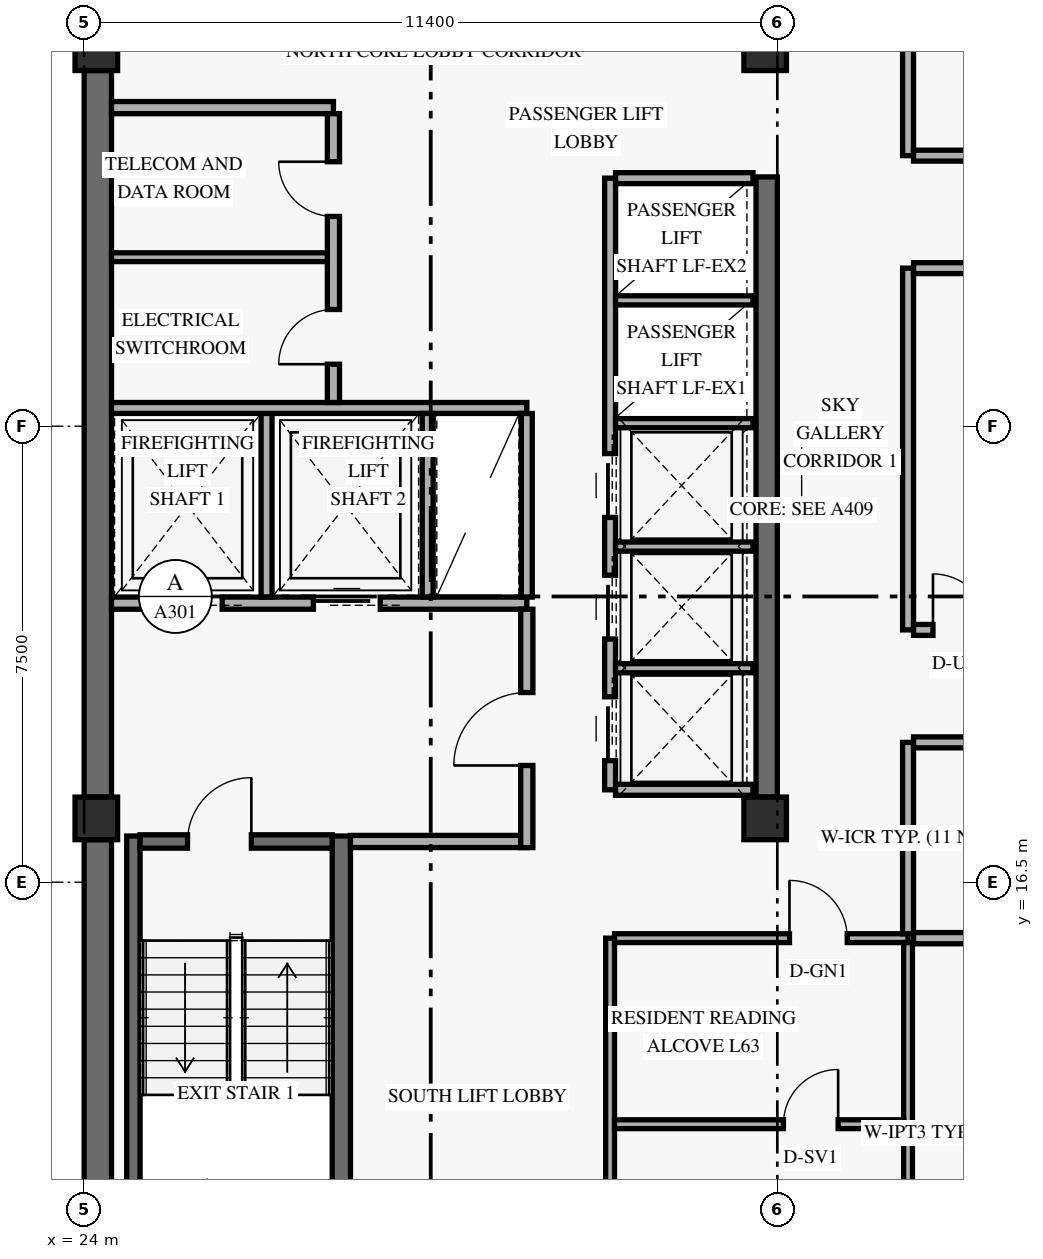
"""IFC4 building model, lengths in metres.
Left out: names, types, materials, properties, quantities, classifications, styles, units other than length and angle.
Written with IfcOpenShell. Run it as: python <this file> out.ifc"""

import sys

from ifc_helpers import new_model, si_unit, direction, frame, frame_2d, origin, origin_2d, place, context, subcontext, project, spatial, rectangle, extrude, element, fill, save


model = new_model("IFC4")
c1 = context("Model", 3, precision=1e-05, world=origin(), true_north=direction((0.0, 1.0)))
c2 = subcontext(c1, "Body", "Model", "MODEL_VIEW")
j1 = project(units=[si_unit("LENGTHUNIT", "METRE"), si_unit("PLANEANGLEUNIT", "RADIAN")], contexts=[c1])
p1 = place(None, origin())
s1 = spatial("IfcSite", under=j1, at=p1, CompositionType="ELEMENT")
p2 = place(p1, origin())
s2 = spatial("IfcBuilding", under=s1, at=p2, CompositionType="ELEMENT")
p3 = place(p2, frame((0.0, 0.0, 242.4)))
s3 = spatial("IfcBuildingStorey", under=s2, at=p3, CompositionType="ELEMENT", Elevation=242.4)
p4 = place(p3, frame((24.225, 9.6, 0.0), z_axis=(0.0, 0.0, 1.0), x_axis=(0.0, 1.0, 0.0)))
e1 = element("IfcWall", 1, at=p4, inside=s3, PredefinedType="SHEAR", context=c2, shape_type="SweptSolid", body=[
    extrude(rectangle(XDim=7.6, YDim=0.45, at=frame_2d((3.8, 0.0))), origin(), (0.0, 0.0, 1.0), 2.821),
])
p5 = place(p3, frame((24.225, 17.9, 0.0), z_axis=(0.0, 0.0, 1.0), x_axis=(0.0, 1.0, 0.0)))
e2 = element("IfcWall", 2, at=p5, inside=s3, PredefinedType="SHEAR", context=c2, shape_type="SweptSolid", body=[
    extrude(rectangle(XDim=11.95, YDim=0.45, at=frame_2d((5.975, 0.0))), origin(), (0.0, 0.0, 1.0), 2.821),
])
p6 = place(p3, frame((35.225, 17.9, 0.0), z_axis=(0.0, 0.0, 1.0), x_axis=(0.0, 1.0, 0.0)))
e3 = element("IfcWall", 3, at=p6, inside=s3, PredefinedType="SHEAR", context=c2, shape_type="SweptSolid", body=[
    extrude(rectangle(XDim=10.2, YDim=0.35, at=frame_2d((5.1, 0.0))), origin(), (0.0, 0.0, 1.0), 2.821),
])
p7 = place(p3, frame((24.81, 9.5, 0.0), z_axis=(0.0, 0.0, 1.0), x_axis=(0.0, 1.0, 0.0)))
e4 = element("IfcWall", 4, at=p7, inside=s3, PredefinedType="SHEAR", context=c2, shape_type="SweptSolid", body=[
    extrude(rectangle(XDim=7.76, YDim=0.22, at=frame_2d((3.88, 0.0))), origin(), (0.0, 0.0, 1.0), 3.36),
])
p8 = place(p3, frame((28.23, 9.5, 0.0), z_axis=(0.0, 0.0, 1.0), x_axis=(0.0, 1.0, 0.0)))
e5 = element("IfcWall", 5, at=p8, inside=s3, PredefinedType="SHEAR", context=c2, shape_type="SweptSolid", body=[
    extrude(rectangle(XDim=7.76, YDim=0.3, at=frame_2d((3.88, 0.0))), origin(), (0.0, 0.0, 1.0), 3.36),
])
p9 = place(p3, frame((24.92, 17.17, 0.0), z_axis=(0.0, 0.0, 1.0), x_axis=(1.0, 0.0, 0.0)))
e6 = element("IfcWall", 6, at=p9, inside=s3, PredefinedType="SHEAR", context=c2, shape_type="SweptSolid", body=[
    extrude(rectangle(XDim=3.16, YDim=0.22, at=frame_2d((1.58, 0.0))), origin(), (0.0, 0.0, 1.0), 3.36),
])
p10 = place(p9, frame((0.78, 0.0, 0.0)))
e7 = element("IfcOpeningElement", 7, at=p10, cuts=e6, PredefinedType="OPENING", context=c2, shape_type="SweptSolid", body=[
    extrude(rectangle(XDim=1.05, YDim=2.15, at=frame_2d((0.525, 1.075))), frame((0.0, 0.12, 0.0), z_axis=(0.0, -1.0, 0.0), x_axis=(1.0, 0.0, 0.0)), (0.0, 0.0, 1.0), 0.24),
])
for number, where, z_axis, x_axis in (
    (8, (24.2, 17.55, 0.0), (0.0, 0.0, 1.0), (1.0, 0.0, 0.0)),
    (9, (24.2, 30.2, 0.0), (0.0, 0.0, 1.0), (1.0, 0.0, 0.0)),
    (10, (35.2, 17.55, 0.0), (0.0, 0.0, 1.0), (1.0, 0.0, 0.0)),
    (11, (35.2, 30.2, 0.0), (0.0, 0.0, 1.0), (1.0, 0.0, 0.0)),
):
    element("IfcColumn", number, at=place(p3, frame(where, z_axis=z_axis, x_axis=x_axis)), inside=s3, PredefinedType="COLUMN", context=c2, shape_type="SweptSolid", body=[
        extrude(rectangle(XDim=0.7, YDim=0.7, at=origin_2d()), origin(), (0.0, 0.0, 1.0), 3.6),
    ])
p11 = place(p3, frame((24.45, 21.09, 0.0), z_axis=(0.0, 0.0, 1.0), x_axis=(1.0, 0.0, 0.0)))
e12 = element("IfcWall", 12, at=p11, inside=s3, PredefinedType="STANDARD", context=c2, shape_type="SweptSolid", body=[
    extrude(rectangle(XDim=6.83, YDim=0.2, at=frame_2d((3.415, 0.0))), origin(), (0.0, 0.0, 1.0), 3.36),
])
p12 = place(p11, frame((0.72, 0.0, 0.0)))
e13 = element("IfcOpeningElement", 13, at=p12, cuts=e12, PredefinedType="OPENING", context=c2, shape_type="SweptSolid", body=[
    extrude(rectangle(XDim=1.1, YDim=2.2, at=frame_2d((0.55, 1.1))), frame((0.0, 0.11, 0.0), z_axis=(0.0, -1.0, 0.0), x_axis=(1.0, 0.0, 0.0)), (0.0, 0.0, 1.0), 0.22),
])
p13 = place(p11, frame((3.32, 0.0, 0.0)))
e14 = element("IfcOpeningElement", 14, at=p13, cuts=e12, PredefinedType="OPENING", context=c2, shape_type="SweptSolid", body=[
    extrude(rectangle(XDim=1.1, YDim=2.2, at=frame_2d((0.55, 1.1))), frame((0.0, 0.11, 0.0), z_axis=(0.0, -1.0, 0.0), x_axis=(1.0, 0.0, 0.0)), (0.0, 0.0, 1.0), 0.22),
])
p14 = place(p3, frame((28.38, 17.17, 0.0), z_axis=(0.0, 0.0, 1.0), x_axis=(1.0, 0.0, 0.0)))
e15 = element("IfcWall", 15, at=p14, inside=s3, PredefinedType="STANDARD", context=c2, shape_type="SweptSolid", body=[
    extrude(rectangle(XDim=2.9, YDim=0.2, at=frame_2d((1.45, 0.0))), origin(), (0.0, 0.0, 1.0), 3.36),
])
p15 = place(p3, frame((31.28, 17.07, 0.0), z_axis=(0.0, 0.0, 1.0), x_axis=(0.0, 1.0, 0.0)))
e16 = element("IfcWall", 16, at=p15, inside=s3, PredefinedType="STANDARD", context=c2, shape_type="SweptSolid", body=[
    extrude(rectangle(XDim=3.92, YDim=0.2, at=frame_2d((1.96, 0.0))), origin(), (0.0, 0.0, 1.0), 2.803),
])
p16 = place(p15, frame((1.35, 0.0, 0.0)))
e17 = element("IfcOpeningElement", 17, at=p16, cuts=e16, PredefinedType="OPENING", context=c2, shape_type="SweptSolid", body=[
    extrude(rectangle(XDim=1.2, YDim=2.15, at=frame_2d((0.6, 1.075))), frame((0.0, 0.11, 0.0), z_axis=(0.0, -1.0, 0.0), x_axis=(1.0, 0.0, 0.0)), (0.0, 0.0, 1.0), 0.22),
])
p17 = place(p3, frame((27.0, 21.19, 0.0), z_axis=(0.0, 0.0, 1.0), x_axis=(0.0, 1.0, 0.0)))
e18 = element("IfcWall", 18, at=p17, inside=s3, PredefinedType="STANDARD", context=c2, shape_type="SweptSolid", body=[
    extrude(rectangle(XDim=3.11, YDim=0.18, at=frame_2d((1.555, 0.0))), origin(), (0.0, 0.0, 1.0), 3.36),
])
p18 = place(p3, frame((24.45, 24.3, 0.0), z_axis=(0.0, 0.0, 1.0), x_axis=(1.0, 0.0, 0.0)))
e19 = element("IfcWall", 19, at=p18, inside=s3, PredefinedType="STANDARD", context=c2, shape_type="SweptSolid", body=[
    extrude(rectangle(XDim=6.83, YDim=0.18, at=frame_2d((3.415, 0.0))), origin(), (0.0, 0.0, 1.0), 3.36),
])
for number, where, z_axis, x_axis in (
    (20, (29.65, 21.19, 0.0), (0.0, 0.0, 1.0), (0.0, 1.0, 0.0)),
    (21, (31.28, 21.19, 0.0), (0.0, 0.0, 1.0), (0.0, 1.0, 0.0)),
):
    element("IfcWall", number, at=place(p3, frame(where, z_axis=z_axis, x_axis=x_axis)), inside=s3, PredefinedType="STANDARD", context=c2, shape_type="SweptSolid", body=[
        extrude(rectangle(XDim=3.02, YDim=0.18, at=frame_2d((1.51, 0.0))), origin(), (0.0, 0.0, 1.0), 3.36),
    ])
p19 = place(p3, frame((24.45, 29.24, 0.0), z_axis=(0.0, 0.0, 1.0), x_axis=(1.0, 0.0, 0.0)))
e22 = element("IfcWall", 22, at=p19, inside=s3, PredefinedType="STANDARD", context=c2, shape_type="SweptSolid", body=[
    extrude(rectangle(XDim=3.65, YDim=0.2, at=frame_2d((1.825, 0.0))), origin(), (0.0, 0.0, 1.0), 3.36),
])
p20 = place(p3, frame((28.1, 24.39, 0.0), z_axis=(0.0, 0.0, 1.0), x_axis=(0.0, 1.0, 0.0)))
e23 = element("IfcWall", 23, at=p20, inside=s3, PredefinedType="STANDARD", context=c2, shape_type="SweptSolid", body=[
    extrude(rectangle(XDim=4.75, YDim=0.2, at=frame_2d((2.375, 0.0))), origin(), (0.0, 0.0, 1.0), 3.36),
])
p21 = place(p20, frame((0.63, 0.0, 0.0)))
e24 = element("IfcOpeningElement", 24, at=p21, cuts=e23, PredefinedType="OPENING", context=c2, shape_type="SweptSolid", body=[
    extrude(rectangle(XDim=0.9, YDim=2.1, at=frame_2d((0.45, 1.05))), frame((0.0, 0.11, 0.0), z_axis=(0.0, -1.0, 0.0), x_axis=(1.0, 0.0, 0.0)), (0.0, 0.0, 1.0), 0.22),
])
p22 = place(p20, frame((3.06, 0.0, 0.0)))
e25 = element("IfcOpeningElement", 25, at=p22, cuts=e23, PredefinedType="OPENING", context=c2, shape_type="SweptSolid", body=[
    extrude(rectangle(XDim=0.9, YDim=2.1, at=frame_2d((0.45, 1.05))), frame((0.0, 0.11, 0.0), z_axis=(0.0, -1.0, 0.0), x_axis=(1.0, 0.0, 0.0)), (0.0, 0.0, 1.0), 0.22),
])
p23 = place(p3, frame((24.45, 26.78, 0.0), z_axis=(0.0, 0.0, 1.0), x_axis=(1.0, 0.0, 0.0)))
e26 = element("IfcWall", 26, at=p23, inside=s3, PredefinedType="PARTITIONING", context=c2, shape_type="SweptSolid", body=[
    extrude(rectangle(XDim=3.55, YDim=0.145, at=frame_2d((1.775, 0.0))), origin(), (0.0, 0.0, 1.0), 3.36),
])
p24 = place(p3, frame((32.65, 18.02, 0.0), z_axis=(0.0, 0.0, 1.0), x_axis=(0.0, 1.0, 0.0)))
e27 = element("IfcWall", 27, at=p24, inside=s3, PredefinedType="STANDARD", context=c2, shape_type="SweptSolid", body=[
    extrude(rectangle(XDim=10.06, YDim=0.18, at=frame_2d((5.03, 0.0))), origin(), (0.0, 0.0, 1.0), 3.36),
])
p25 = place(p24, frame((0.48, 0.0, 0.0)))
e28 = element("IfcOpeningElement", 28, at=p25, cuts=e27, PredefinedType="OPENING", context=c2, shape_type="SweptSolid", body=[
    extrude(rectangle(XDim=1.05, YDim=2.2, at=frame_2d((0.525, 1.1))), frame((0.0, 0.1, 0.0), z_axis=(0.0, -1.0, 0.0), x_axis=(1.0, 0.0, 0.0)), (0.0, 0.0, 1.0), 0.2),
])
p26 = place(p24, frame((2.48, 0.0, 0.0)))
e29 = element("IfcOpeningElement", 29, at=p26, cuts=e27, PredefinedType="OPENING", context=c2, shape_type="SweptSolid", body=[
    extrude(rectangle(XDim=1.05, YDim=2.2, at=frame_2d((0.525, 1.1))), frame((0.0, 0.1, 0.0), z_axis=(0.0, -1.0, 0.0), x_axis=(1.0, 0.0, 0.0)), (0.0, 0.0, 1.0), 0.2),
])
p27 = place(p24, frame((4.48, 0.0, 0.0)))
e30 = element("IfcOpeningElement", 30, at=p27, cuts=e27, PredefinedType="OPENING", context=c2, shape_type="SweptSolid", body=[
    extrude(rectangle(XDim=1.05, YDim=2.2, at=frame_2d((0.525, 1.1))), frame((0.0, 0.1, 0.0), z_axis=(0.0, -1.0, 0.0), x_axis=(1.0, 0.0, 0.0)), (0.0, 0.0, 1.0), 0.2),
])
for number, where, z_axis, x_axis in (
    (31, (32.74, 18.02, 0.0), (0.0, 0.0, 1.0), (1.0, 0.0, 0.0)),
    (32, (32.74, 28.08, 0.0), (0.0, 0.0, 1.0), (1.0, 0.0, 0.0)),
):
    element("IfcWall", number, at=place(p3, frame(where, z_axis=z_axis, x_axis=x_axis)), inside=s3, PredefinedType="STANDARD", context=c2, shape_type="SweptSolid", body=[
        extrude(rectangle(XDim=2.26, YDim=0.18, at=frame_2d((1.13, 0.0))), origin(), (0.0, 0.0, 1.0), 3.36),
    ])
for number, where, z_axis, x_axis in (
    (33, (32.74, 20.02, 0.0), (0.0, 0.0, 1.0), (1.0, 0.0, 0.0)),
    (34, (32.74, 22.02, 0.0), (0.0, 0.0, 1.0), (1.0, 0.0, 0.0)),
    (35, (32.74, 24.05, 0.0), (0.0, 0.0, 1.0), (1.0, 0.0, 0.0)),
    (36, (32.74, 26.07, 0.0), (0.0, 0.0, 1.0), (1.0, 0.0, 0.0)),
):
    element("IfcWall", number, at=place(p3, frame(where, z_axis=z_axis, x_axis=x_axis)), inside=s3, PredefinedType="STANDARD", context=c2, shape_type="SweptSolid", body=[
        extrude(rectangle(XDim=2.26, YDim=0.15, at=frame_2d((1.13, 0.0))), origin(), (0.0, 0.0, 1.0), 3.36),
    ])
p28 = place(p3, frame((32.65, 9.5, 0.0), z_axis=(0.0, 0.0, 1.0), x_axis=(0.0, 1.0, 0.0)))
e37 = element("IfcWall", 37, at=p28, inside=s3, PredefinedType="PARTITIONING", context=c2, shape_type="SweptSolid", body=[
    extrude(rectangle(XDim=6.08, YDim=0.145, at=frame_2d((3.04, 0.0))), origin(), (0.0, 0.0, 1.0), 3.36),
])
p29 = place(p3, frame((32.722, 15.58, 0.0), z_axis=(0.0, 0.0, 1.0), x_axis=(1.0, 0.0, 0.0)))
e38 = element("IfcWall", 38, at=p29, inside=s3, PredefinedType="PARTITIONING", context=c2, shape_type="SweptSolid", body=[
    extrude(rectangle(XDim=4.828, YDim=0.145, at=frame_2d((2.414, 0.0))), origin(), (0.0, 0.0, 1.0), 2.803),
])
p30 = place(p29, frame((2.877, 0.0, 0.0)))
e39 = element("IfcOpeningElement", 39, at=p30, cuts=e38, PredefinedType="OPENING", context=c2, shape_type="SweptSolid", body=[
    extrude(rectangle(XDim=0.95, YDim=2.15, at=frame_2d((0.475, 1.075))), frame((0.0, 0.083, 0.0), z_axis=(0.0, -1.0, 0.0), x_axis=(1.0, 0.0, 0.0)), (0.0, 0.0, 1.0), 0.165),
])
p31 = place(p3, frame((37.55, 9.25, 0.0), z_axis=(0.0, 0.0, 1.0), x_axis=(0.0, 1.0, 0.0)))
e40 = element("IfcWall", 40, at=p31, inside=s3, PredefinedType="PARTITIONING", context=c2, shape_type="SweptSolid", body=[
    extrude(rectangle(XDim=6.258, YDim=0.145, at=frame_2d((3.129, 0.0))), origin(), (0.0, 0.0, 1.0), 2.803),
])
p32 = place(p3, frame((32.722, 12.52, 0.0), z_axis=(0.0, 0.0, 1.0), x_axis=(1.0, 0.0, 0.0)))
e41 = element("IfcWall", 41, at=p32, inside=s3, PredefinedType="PARTITIONING", context=c2, shape_type="SweptSolid", body=[
    extrude(rectangle(XDim=4.755, YDim=0.145, at=frame_2d((2.377, 0.0))), origin(), (0.0, 0.0, 1.0), 2.803),
])
p33 = place(p32, frame((2.778, 0.0, 0.0)))
e42 = element("IfcOpeningElement", 42, at=p33, cuts=e41, PredefinedType="OPENING", context=c2, shape_type="SweptSolid", body=[
    extrude(rectangle(XDim=0.9, YDim=2.1, at=frame_2d((0.45, 1.05))), frame((0.0, 0.083, 0.0), z_axis=(0.0, -1.0, 0.0), x_axis=(1.0, 0.0, 0.0)), (0.0, 0.0, 1.0), 0.165),
])
p34 = place(p3, frame((37.55, 15.653, 0.0), z_axis=(0.0, 0.0, 1.0), x_axis=(0.0, 1.0, 0.0)))
e43 = element("IfcWall", 43, at=p34, inside=s3, PredefinedType="STANDARD", context=c2, shape_type="SweptSolid", body=[
    extrude(rectangle(XDim=3.147, YDim=0.18, at=frame_2d((1.574, 0.0))), origin(), (0.0, 0.0, 1.0), 2.803),
])
p35 = place(p3, frame((37.55, 20.65, 0.0), z_axis=(0.0, 0.0, 1.0), x_axis=(0.0, 1.0, 0.0)))
e44 = element("IfcWall", 44, at=p35, inside=s3, PredefinedType="STANDARD", context=c2, shape_type="SweptSolid", body=[
    extrude(rectangle(XDim=5.95, YDim=0.18, at=frame_2d((2.975, 0.0))), origin(), (0.0, 0.0, 1.0), 3.36),
])
p36 = place(p3, frame((37.55, 28.45, 0.0), z_axis=(0.0, 0.0, 1.0), x_axis=(0.0, 1.0, 0.0)))
e45 = element("IfcWall", 45, at=p36, inside=s3, PredefinedType="STANDARD", context=c2, shape_type="SweptSolid", body=[
    extrude(rectangle(XDim=2.828, YDim=0.18, at=frame_2d((1.414, 0.0))), origin(), (0.0, 0.0, 1.0), 2.803),
])
p37 = place(p3, frame((37.64, 18.8, 0.0), z_axis=(0.0, 0.0, 1.0), x_axis=(1.0, 0.0, 0.0)))
e46 = element("IfcWall", 46, at=p37, inside=s3, PredefinedType="STANDARD", context=c2, shape_type="SweptSolid", body=[
    extrude(rectangle(XDim=13.47, YDim=0.18, at=frame_2d((6.735, 0.0))), origin(), (0.0, 0.0, 1.0), 2.803),
])
p38 = place(p3, frame((37.64, 20.65, 0.0), z_axis=(0.0, 0.0, 1.0), x_axis=(1.0, 0.0, 0.0)))
e47 = element("IfcWall", 47, at=p38, inside=s3, PredefinedType="STANDARD", context=c2, shape_type="SweptSolid", body=[
    extrude(rectangle(XDim=13.47, YDim=0.18, at=frame_2d((6.735, 0.0))), origin(), (0.0, 0.0, 1.0), 2.803),
])
p39 = place(p38, frame((0.32, 0.0, 0.0)))
e48 = element("IfcOpeningElement", 48, at=p39, cuts=e47, PredefinedType="OPENING", context=c2, shape_type="SweptSolid", body=[
    extrude(rectangle(XDim=0.92, YDim=2.15, at=frame_2d((0.46, 1.075))), frame((0.0, 0.1, 0.0), z_axis=(0.0, -1.0, 0.0), x_axis=(1.0, 0.0, 0.0)), (0.0, 0.0, 1.0), 0.2),
])
for number, where, z_axis, x_axis in (
    (49, (37.64, 26.6, 0.0), (0.0, 0.0, 1.0), (1.0, 0.0, 0.0)),
    (50, (37.64, 28.45, 0.0), (0.0, 0.0, 1.0), (1.0, 0.0, 0.0)),
):
    element("IfcWall", number, at=place(p3, frame(where, z_axis=z_axis, x_axis=x_axis)), inside=s3, PredefinedType="STANDARD", context=c2, shape_type="SweptSolid", body=[
        extrude(rectangle(XDim=13.47, YDim=0.18, at=frame_2d((6.735, 0.0))), origin(), (0.0, 0.0, 1.0), 2.803),
    ])
p40 = place(p3, frame((37.64, 15.58, 0.0), z_axis=(0.0, 0.0, 1.0), x_axis=(1.0, 0.0, 0.0)))
e51 = element("IfcWall", 51, at=p40, inside=s3, PredefinedType="PARTITIONING", context=c2, shape_type="SweptSolid", body=[
    extrude(rectangle(XDim=13.47, YDim=0.185, at=frame_2d((6.735, 0.0))), origin(), (0.0, 0.0, 1.0), 2.803),
])
p41 = place(p10, frame((1.05, 0.0, 0.0), z_axis=(0.0, 0.0, 1.0), x_axis=(-1.0, 0.0, 0.0)))
e52 = element("IfcDoor", 52, at=p41, inside=s3, OperationType="SINGLE_SWING_LEFT", PredefinedType="DOOR", context=c2, shape_type="SweptSolid", body=[
    extrude(rectangle(XDim=1.05, YDim=2.15, at=frame_2d((0.525, 1.075))), frame((0.0, 0.025, 0.0), z_axis=(0.0, -1.0, 0.0), x_axis=(1.0, 0.0, 0.0)), (0.0, 0.0, 1.0), 0.05),
])
fill(e7, e52)
p42 = place(p12, origin())
e53 = element("IfcDoor", 53, at=p42, inside=s3, OperationType="SLIDING_TO_LEFT", PredefinedType="DOOR", context=c2, shape_type="SweptSolid", body=[
    extrude(rectangle(XDim=1.1, YDim=2.2, at=frame_2d((0.55, 1.1))), frame((0.0, 0.025, 0.0), z_axis=(0.0, -1.0, 0.0), x_axis=(1.0, 0.0, 0.0)), (0.0, 0.0, 1.0), 0.05),
])
fill(e13, e53)
p43 = place(p13, origin())
e54 = element("IfcDoor", 54, at=p43, inside=s3, OperationType="SLIDING_TO_LEFT", PredefinedType="DOOR", context=c2, shape_type="SweptSolid", body=[
    extrude(rectangle(XDim=1.1, YDim=2.2, at=frame_2d((0.55, 1.1))), frame((0.0, 0.025, 0.0), z_axis=(0.0, -1.0, 0.0), x_axis=(1.0, 0.0, 0.0)), (0.0, 0.0, 1.0), 0.05),
])
fill(e14, e54)
p44 = place(p16, origin())
e55 = element("IfcDoor", 55, at=p44, inside=s3, OperationType="SINGLE_SWING_LEFT", PredefinedType="DOOR", context=c2, shape_type="SweptSolid", body=[
    extrude(rectangle(XDim=1.2, YDim=2.15, at=frame_2d((0.6, 1.075))), frame((0.0, 0.025, 0.0), z_axis=(0.0, -1.0, 0.0), x_axis=(1.0, 0.0, 0.0)), (0.0, 0.0, 1.0), 0.05),
])
fill(e17, e55)
p45 = place(p21, origin())
e56 = element("IfcDoor", 56, at=p45, inside=s3, OperationType="SINGLE_SWING_LEFT", PredefinedType="DOOR", context=c2, shape_type="SweptSolid", body=[
    extrude(rectangle(XDim=0.9, YDim=2.1, at=frame_2d((0.45, 1.05))), frame((0.0, 0.025, 0.0), z_axis=(0.0, -1.0, 0.0), x_axis=(1.0, 0.0, 0.0)), (0.0, 0.0, 1.0), 0.05),
])
fill(e24, e56)
p46 = place(p22, origin())
e57 = element("IfcDoor", 57, at=p46, inside=s3, OperationType="SINGLE_SWING_RIGHT", PredefinedType="DOOR", context=c2, shape_type="SweptSolid", body=[
    extrude(rectangle(XDim=0.9, YDim=2.1, at=frame_2d((0.45, 1.05))), frame((0.0, 0.025, 0.0), z_axis=(0.0, -1.0, 0.0), x_axis=(1.0, 0.0, 0.0)), (0.0, 0.0, 1.0), 0.05),
])
fill(e25, e57)
p47 = place(p25, origin())
e58 = element("IfcDoor", 58, at=p47, inside=s3, OperationType="SLIDING_TO_LEFT", PredefinedType="DOOR", context=c2, shape_type="SweptSolid", body=[
    extrude(rectangle(XDim=1.05, YDim=2.2, at=frame_2d((0.525, 1.1))), frame((0.0, 0.025, 0.0), z_axis=(0.0, -1.0, 0.0), x_axis=(1.0, 0.0, 0.0)), (0.0, 0.0, 1.0), 0.05),
])
fill(e28, e58)
p48 = place(p26, origin())
e59 = element("IfcDoor", 59, at=p48, inside=s3, OperationType="SLIDING_TO_LEFT", PredefinedType="DOOR", context=c2, shape_type="SweptSolid", body=[
    extrude(rectangle(XDim=1.05, YDim=2.2, at=frame_2d((0.525, 1.1))), frame((0.0, 0.025, 0.0), z_axis=(0.0, -1.0, 0.0), x_axis=(1.0, 0.0, 0.0)), (0.0, 0.0, 1.0), 0.05),
])
fill(e29, e59)
p49 = place(p27, origin())
e60 = element("IfcDoor", 60, at=p49, inside=s3, OperationType="SLIDING_TO_LEFT", PredefinedType="DOOR", context=c2, shape_type="SweptSolid", body=[
    extrude(rectangle(XDim=1.05, YDim=2.2, at=frame_2d((0.525, 1.1))), frame((0.0, 0.025, 0.0), z_axis=(0.0, -1.0, 0.0), x_axis=(1.0, 0.0, 0.0)), (0.0, 0.0, 1.0), 0.05),
])
fill(e30, e60)
p50 = place(p30, origin())
e61 = element("IfcDoor", 61, at=p50, inside=s3, OperationType="SINGLE_SWING_LEFT", PredefinedType="DOOR", context=c2, shape_type="SweptSolid", body=[
    extrude(rectangle(XDim=0.95, YDim=2.15, at=frame_2d((0.475, 1.075))), frame((0.0, 0.025, 0.0), z_axis=(0.0, -1.0, 0.0), x_axis=(1.0, 0.0, 0.0)), (0.0, 0.0, 1.0), 0.05),
])
fill(e39, e61)
p51 = place(p33, origin())
e62 = element("IfcDoor", 62, at=p51, inside=s3, OperationType="SINGLE_SWING_RIGHT", PredefinedType="DOOR", context=c2, shape_type="SweptSolid", body=[
    extrude(rectangle(XDim=0.9, YDim=2.1, at=frame_2d((0.45, 1.05))), frame((0.0, 0.025, 0.0), z_axis=(0.0, -1.0, 0.0), x_axis=(1.0, 0.0, 0.0)), (0.0, 0.0, 1.0), 0.05),
])
fill(e42, e62)
p52 = place(p39, origin())
e63 = element("IfcDoor", 63, at=p52, inside=s3, OperationType="SINGLE_SWING_LEFT", PredefinedType="DOOR", context=c2, shape_type="SweptSolid", body=[
    extrude(rectangle(XDim=0.92, YDim=2.15, at=frame_2d((0.46, 1.075))), frame((0.0, 0.025, 0.0), z_axis=(0.0, -1.0, 0.0), x_axis=(1.0, 0.0, 0.0)), (0.0, 0.0, 1.0), 0.05),
])
fill(e48, e63)
save(model, sys.argv[1])
